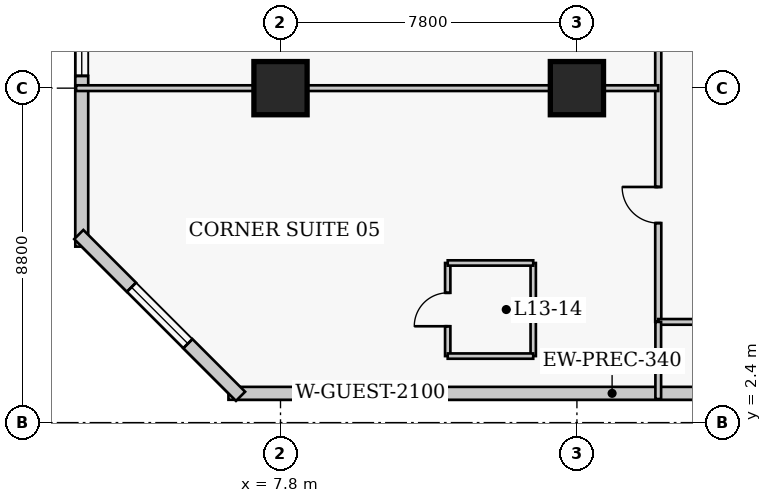
"""IFC4 building model, lengths in metres.
Left out: names, types, materials, properties, quantities, classifications, styles, units other than length and angle.
Written with IfcOpenShell. Run it as: python <this file> out.ifc"""

import sys

from ifc_helpers import new_model, si_unit, direction, frame, frame_2d, origin, origin_2d, place, context, subcontext, project, spatial, rectangle, extrude, element, fill, save


model = new_model("IFC4")
c1 = context("Model", 3, precision=1e-05, world=origin(), true_north=direction((0.0, 1.0)))
c2 = subcontext(c1, "Body", "Model", "MODEL_VIEW")
j1 = project(units=[si_unit("LENGTHUNIT", "METRE"), si_unit("PLANEANGLEUNIT", "RADIAN")], contexts=[c1])
p1 = place(None, origin())
s1 = spatial("IfcSite", under=j1, at=p1, CompositionType="ELEMENT")
p2 = place(p1, origin())
s2 = spatial("IfcBuilding", under=s1, at=p2, CompositionType="ELEMENT")
p3 = place(p2, frame((0.0, 0.0, 56.4)))
s3 = spatial("IfcBuildingStorey", under=s2, at=p3, CompositionType="ELEMENT", Elevation=56.4)
for number, where, z_axis, x_axis in (
    (1, (7.8, 11.2, 0.0), (0.0, 0.0, 1.0), (1.0, 0.0, 0.0)),
    (2, (15.6, 11.2, 0.0), (0.0, 0.0, 1.0), (1.0, 0.0, 0.0)),
):
    element("IfcColumn", number, at=place(p3, frame(where, z_axis=z_axis, x_axis=x_axis)), inside=s3, PredefinedType="COLUMN", context=c2, shape_type="SweptSolid", body=[
        extrude(rectangle(XDim=1.4, YDim=1.4, at=origin_2d()), origin(), (0.0, 0.0, 1.0), 3.8),
    ])
p4 = place(p3, frame((6.43, 3.17, 0.0), z_axis=(0.0, 0.0, 1.0), x_axis=(1.0, 0.0, 0.0)))
e3 = element("IfcWall", 3, at=p4, inside=s3, PredefinedType="SOLIDWALL", context=c2, shape_type="SweptSolid", body=[
    extrude(rectangle(XDim=29.89, YDim=0.34, at=frame_2d((14.945, 0.0))), origin(), (0.0, 0.0, 1.0), 3.54),
])
p5 = place(p4, frame((20.17, 0.0, 0.0)))
e4 = element("IfcOpeningElement", 4, at=p5, cuts=e3, PredefinedType="OPENING", context=c2, shape_type="SweptSolid", body=[
    extrude(rectangle(XDim=1.4, YDim=2.15, at=frame_2d((0.7, 1.075))), frame((0.0, 0.18, 0.0), z_axis=(0.0, -1.0, 0.0), x_axis=(1.0, 0.0, 0.0)), (0.0, 0.0, 1.0), 0.36),
])
p6 = place(p4, frame((2.686, 0.0, 0.85)))
e5 = element("IfcOpeningElement", 5, at=p6, cuts=e3, PredefinedType="OPENING", context=c2, shape_type="SweptSolid", body=[
    extrude(rectangle(XDim=2.1, YDim=1.85, at=frame_2d((1.05, 0.925))), frame((0.0, 0.18, 0.0), z_axis=(0.0, -1.0, 0.0), x_axis=(1.0, 0.0, 0.0)), (0.0, 0.0, 1.0), 0.36),
])
p7 = place(p4, frame((25.104, 0.0, 0.85)))
e6 = element("IfcOpeningElement", 6, at=p7, cuts=e3, PredefinedType="OPENING", context=c2, shape_type="SweptSolid", body=[
    extrude(rectangle(XDim=2.1, YDim=1.85, at=frame_2d((1.05, 0.925))), frame((0.0, 0.18, 0.0), z_axis=(0.0, -1.0, 0.0), x_axis=(1.0, 0.0, 0.0)), (0.0, 0.0, 1.0), 0.36),
])
p8 = place(p4, frame((15.405, 0.0, 0.85)))
e7 = element("IfcOpeningElement", 7, at=p8, cuts=e3, PredefinedType="OPENING", context=c2, shape_type="SweptSolid", body=[
    extrude(rectangle(XDim=1.3, YDim=1.7, at=frame_2d((0.65, 0.85))), frame((0.0, 0.18, 0.0), z_axis=(0.0, -1.0, 0.0), x_axis=(1.0, 0.0, 0.0)), (0.0, 0.0, 1.0), 0.36),
])
p9 = place(p3, frame((2.57, 42.17, 0.0), z_axis=(0.0, 0.0, 1.0), x_axis=(0.0, -1.0, 0.0)))
e8 = element("IfcWall", 8, at=p9, inside=s3, PredefinedType="SOLIDWALL", context=c2, shape_type="SweptSolid", body=[
    extrude(rectangle(XDim=35.14, YDim=0.34, at=frame_2d((17.57, 0.0))), origin(), (0.0, 0.0, 1.0), 3.54),
])
p10 = place(p9, frame((2.692, 0.0, 0.85)))
e9 = element("IfcOpeningElement", 9, at=p10, cuts=e8, PredefinedType="OPENING", context=c2, shape_type="SweptSolid", body=[
    extrude(rectangle(XDim=2.1, YDim=1.85, at=frame_2d((1.05, 0.925))), frame((0.0, 0.18, 0.0), z_axis=(0.0, -1.0, 0.0), x_axis=(1.0, 0.0, 0.0)), (0.0, 0.0, 1.0), 0.36),
])
p11 = place(p9, frame((10.978, 0.0, 0.85)))
e10 = element("IfcOpeningElement", 10, at=p11, cuts=e8, PredefinedType="OPENING", context=c2, shape_type="SweptSolid", body=[
    extrude(rectangle(XDim=2.1, YDim=1.85, at=frame_2d((1.05, 0.925))), frame((0.0, 0.18, 0.0), z_axis=(0.0, -1.0, 0.0), x_axis=(1.0, 0.0, 0.0)), (0.0, 0.0, 1.0), 0.36),
])
p12 = place(p9, frame((19.762, 0.0, 0.85)))
e11 = element("IfcOpeningElement", 11, at=p12, cuts=e8, PredefinedType="OPENING", context=c2, shape_type="SweptSolid", body=[
    extrude(rectangle(XDim=2.1, YDim=1.85, at=frame_2d((1.05, 0.925))), frame((0.0, 0.18, 0.0), z_axis=(0.0, -1.0, 0.0), x_axis=(1.0, 0.0, 0.0)), (0.0, 0.0, 1.0), 0.36),
])
p13 = place(p9, frame((28.548, 0.0, 0.85)))
e12 = element("IfcOpeningElement", 12, at=p13, cuts=e8, PredefinedType="OPENING", context=c2, shape_type="SweptSolid", body=[
    extrude(rectangle(XDim=2.1, YDim=1.85, at=frame_2d((1.05, 0.925))), frame((0.0, 0.18, 0.0), z_axis=(0.0, -1.0, 0.0), x_axis=(1.0, 0.0, 0.0)), (0.0, 0.0, 1.0), 0.36),
])
p14 = place(p3, frame((2.492, 7.348, 0.0), z_axis=(0.0, 0.0, 1.0), x_axis=(0.707106781187, -0.707106781187, 0.0)))
e13 = element("IfcWall", 13, at=p14, inside=s3, PredefinedType="SOLIDWALL", context=c2, shape_type="SweptSolid", body=[
    extrude(rectangle(XDim=6.02, YDim=0.34, at=frame_2d((3.01, 0.0))), origin(), (0.0, 0.0, 1.0), 3.54),
])
p15 = place(p14, frame((1.96, 0.0, 0.85)))
e14 = element("IfcOpeningElement", 14, at=p15, cuts=e13, PredefinedType="OPENING", context=c2, shape_type="SweptSolid", body=[
    extrude(rectangle(XDim=2.1, YDim=1.85, at=frame_2d((1.05, 0.925))), frame((0.0, 0.18, 0.0), z_axis=(0.0, -1.0, 0.0), x_axis=(1.0, 0.0, 0.0)), (0.0, 0.0, 1.0), 0.36),
])
p16 = place(p3, frame((17.74, 5.05, 0.0), z_axis=(0.0, 0.0, 1.0), x_axis=(0.0, 1.0, 0.0)))
e15 = element("IfcWall", 15, at=p16, inside=s3, PredefinedType="PARTITIONING", context=c2, shape_type="SweptSolid", body=[
    extrude(rectangle(XDim=35.6, YDim=0.16, at=frame_2d((17.8, 0.0))), origin(), (0.0, 0.0, 1.0), 3.54),
])
p17 = place(p16, frame((2.6, 0.0, 0.0)))
e16 = element("IfcOpeningElement", 16, at=p17, cuts=e15, PredefinedType="OPENING", context=c2, shape_type="SweptSolid", body=[
    extrude(rectangle(XDim=0.95, YDim=2.1, at=frame_2d((0.475, 1.05))), frame((0.0, 0.09, 0.0), z_axis=(0.0, -1.0, 0.0), x_axis=(1.0, 0.0, 0.0)), (0.0, 0.0, 1.0), 0.18),
])
p18 = place(p16, frame((10.075, 0.0, 0.0)))
e17 = element("IfcOpeningElement", 17, at=p18, cuts=e15, PredefinedType="OPENING", context=c2, shape_type="SweptSolid", body=[
    extrude(rectangle(XDim=0.95, YDim=2.1, at=frame_2d((0.475, 1.05))), frame((0.0, 0.09, 0.0), z_axis=(0.0, -1.0, 0.0), x_axis=(1.0, 0.0, 0.0)), (0.0, 0.0, 1.0), 0.18),
])
p19 = place(p16, frame((18.875, 0.0, 0.0)))
e18 = element("IfcOpeningElement", 18, at=p19, cuts=e15, PredefinedType="OPENING", context=c2, shape_type="SweptSolid", body=[
    extrude(rectangle(XDim=0.95, YDim=2.1, at=frame_2d((0.475, 1.05))), frame((0.0, 0.09, 0.0), z_axis=(0.0, -1.0, 0.0), x_axis=(1.0, 0.0, 0.0)), (0.0, 0.0, 1.0), 0.18),
])
p20 = place(p16, frame((27.275, 0.0, 0.0)))
e19 = element("IfcOpeningElement", 19, at=p20, cuts=e15, PredefinedType="OPENING", context=c2, shape_type="SweptSolid", body=[
    extrude(rectangle(XDim=0.95, YDim=2.1, at=frame_2d((0.475, 1.05))), frame((0.0, 0.09, 0.0), z_axis=(0.0, -1.0, 0.0), x_axis=(1.0, 0.0, 0.0)), (0.0, 0.0, 1.0), 0.18),
])
p21 = place(p16, frame((33.986, 0.0, 0.0)))
e20 = element("IfcOpeningElement", 20, at=p21, cuts=e15, PredefinedType="OPENING", context=c2, shape_type="SweptSolid", body=[
    extrude(rectangle(XDim=1.0, YDim=2.15, at=frame_2d((0.5, 1.075))), frame((0.0, 0.09, 0.0), z_axis=(0.0, -1.0, 0.0), x_axis=(1.0, 0.0, 0.0)), (0.0, 0.0, 1.0), 0.18),
])
p22 = place(p3, frame((17.74, 5.05, 0.0), z_axis=(0.0, 0.0, 1.0), x_axis=(1.0, 0.0, 0.0)))
e21 = element("IfcWall", 21, at=p22, inside=s3, PredefinedType="PARTITIONING", context=c2, shape_type="SweptSolid", body=[
    extrude(rectangle(XDim=2.22, YDim=0.15, at=frame_2d((1.11, 0.0))), origin(), (0.0, 0.0, 1.0), 3.54),
])
p23 = place(p3, frame((17.74, 3.02, 0.0), z_axis=(0.0, 0.0, 1.0), x_axis=(0.0, 1.0, 0.0)))
e22 = element("IfcWall", 22, at=p23, inside=s3, PredefinedType="PARTITIONING", context=c2, shape_type="SweptSolid", body=[
    extrude(rectangle(XDim=2.03, YDim=0.15, at=frame_2d((1.015, 0.0))), origin(), (0.0, 0.0, 1.0), 3.54),
])
p24 = place(p3, frame((12.2, 4.15, 0.0), z_axis=(0.0, 0.0, 1.0), x_axis=(0.0, 1.0, 0.0)))
e23 = element("IfcWall", 23, at=p24, inside=s3, PredefinedType="PLUMBINGWALL", context=c2, shape_type="SweptSolid", body=[
    extrude(rectangle(XDim=2.45, YDim=0.14, at=frame_2d((1.225, 0.0))), origin(), (0.0, 0.0, 1.0), 3.54),
])
p25 = place(p24, frame((0.785, 0.0, 0.0)))
e24 = element("IfcOpeningElement", 24, at=p25, cuts=e23, PredefinedType="OPENING", context=c2, shape_type="SweptSolid", body=[
    extrude(rectangle(XDim=0.88, YDim=2.05, at=frame_2d((0.44, 1.025))), frame((0.0, 0.08, 0.0), z_axis=(0.0, -1.0, 0.0), x_axis=(1.0, 0.0, 0.0)), (0.0, 0.0, 1.0), 0.16),
])
p26 = place(p3, frame((14.45, 4.15, 0.0), z_axis=(0.0, 0.0, 1.0), x_axis=(0.0, 1.0, 0.0)))
e25 = element("IfcWall", 25, at=p26, inside=s3, PredefinedType="PLUMBINGWALL", context=c2, shape_type="SweptSolid", body=[
    extrude(rectangle(XDim=2.45, YDim=0.14, at=frame_2d((1.225, 0.0))), origin(), (0.0, 0.0, 1.0), 3.54),
])
for number, where, z_axis, x_axis in (
    (26, (12.2, 4.15, 0.0), (0.0, 0.0, 1.0), (1.0, 0.0, 0.0)),
    (27, (12.2, 6.6, 0.0), (0.0, 0.0, 1.0), (1.0, 0.0, 0.0)),
):
    element("IfcWall", number, at=place(p3, frame(where, z_axis=z_axis, x_axis=x_axis)), inside=s3, PredefinedType="PLUMBINGWALL", context=c2, shape_type="SweptSolid", body=[
        extrude(rectangle(XDim=2.25, YDim=0.14, at=frame_2d((1.125, 0.0))), origin(), (0.0, 0.0, 1.0), 3.54),
    ])
p27 = place(p3, frame((2.42, 11.2, 0.0), z_axis=(0.0, 0.0, 1.0), x_axis=(1.0, 0.0, 0.0)))
e28 = element("IfcWall", 28, at=p27, inside=s3, PredefinedType="PARTITIONING", context=c2, shape_type="SweptSolid", body=[
    extrude(rectangle(XDim=15.32, YDim=0.15, at=frame_2d((7.66, 0.0))), origin(), (0.0, 0.0, 1.0), 2.593),
])
p28 = place(p6, origin())
e29 = element("IfcWindow", 29, at=p28, inside=s3, PartitioningType="SINGLE_PANEL", PredefinedType="WINDOW", context=c2, shape_type="SweptSolid", body=[
    extrude(rectangle(XDim=2.1, YDim=1.85, at=frame_2d((1.05, 0.925))), frame((0.0, 0.03, 0.0), z_axis=(0.0, -1.0, 0.0), x_axis=(1.0, 0.0, 0.0)), (0.0, 0.0, 1.0), 0.06),
])
fill(e5, e29)
p29 = place(p13, origin())
e30 = element("IfcWindow", 30, at=p29, inside=s3, PartitioningType="SINGLE_PANEL", PredefinedType="WINDOW", context=c2, shape_type="SweptSolid", body=[
    extrude(rectangle(XDim=2.1, YDim=1.85, at=frame_2d((1.05, 0.925))), frame((0.0, 0.03, 0.0), z_axis=(0.0, -1.0, 0.0), x_axis=(1.0, 0.0, 0.0)), (0.0, 0.0, 1.0), 0.06),
])
fill(e12, e30)
p30 = place(p15, origin())
e31 = element("IfcWindow", 31, at=p30, inside=s3, PartitioningType="SINGLE_PANEL", PredefinedType="WINDOW", context=c2, shape_type="SweptSolid", body=[
    extrude(rectangle(XDim=2.1, YDim=1.85, at=frame_2d((1.05, 0.925))), frame((0.0, 0.03, 0.0), z_axis=(0.0, -1.0, 0.0), x_axis=(1.0, 0.0, 0.0)), (0.0, 0.0, 1.0), 0.06),
])
fill(e14, e31)
p31 = place(p25, origin())
e32 = element("IfcDoor", 32, at=p31, inside=s3, OperationType="SINGLE_SWING_LEFT", PredefinedType="DOOR", context=c2, shape_type="SweptSolid", body=[
    extrude(rectangle(XDim=0.88, YDim=2.05, at=frame_2d((0.44, 1.025))), frame((0.0, 0.025, 0.0), z_axis=(0.0, -1.0, 0.0), x_axis=(1.0, 0.0, 0.0)), (0.0, 0.0, 1.0), 0.05),
])
fill(e24, e32)
p32 = place(p17, origin())
e33 = element("IfcDoor", 33, at=p32, inside=s3, OperationType="SINGLE_SWING_RIGHT", PredefinedType="DOOR", context=c2, shape_type="SweptSolid", body=[
    extrude(rectangle(XDim=0.95, YDim=2.1, at=frame_2d((0.475, 1.05))), frame((0.0, 0.025, 0.0), z_axis=(0.0, -1.0, 0.0), x_axis=(1.0, 0.0, 0.0)), (0.0, 0.0, 1.0), 0.05),
])
fill(e16, e33)
save(model, sys.argv[1])
